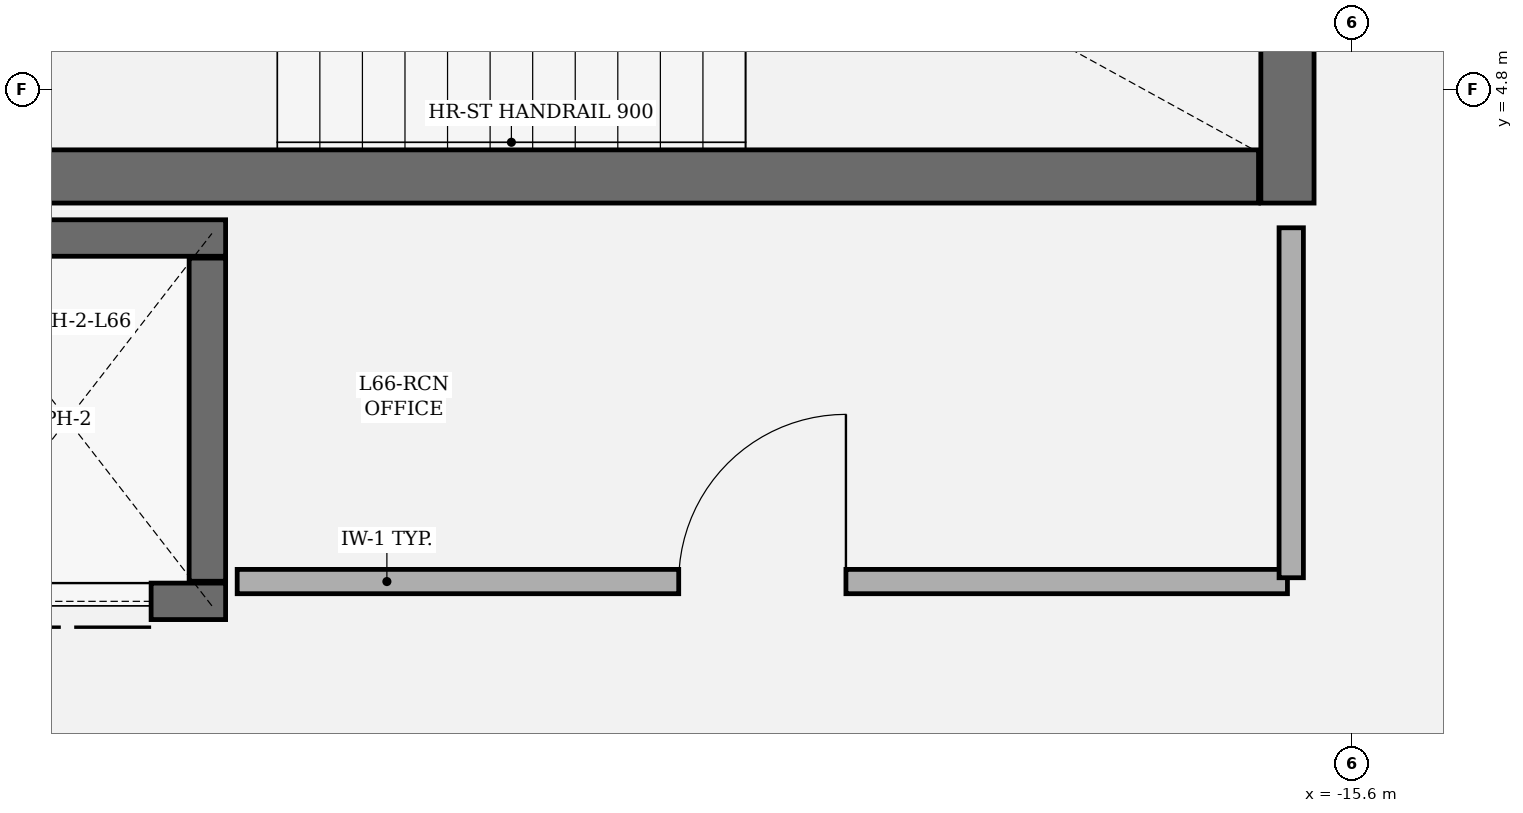
"""IFC4 building model, lengths in metres.
Left out: names, types, materials, properties, quantities, classifications, styles, units other than length and angle.
Written with IfcOpenShell. Run it as: python <this file> out.ifc"""

import sys

from ifc_helpers import new_model, si_unit, direction, frame, frame_2d, origin, place, context, subcontext, project, spatial, rectangle, extrude, element, fill, save


model = new_model("IFC4")
c1 = context("Model", 3, precision=1e-05, world=origin(), true_north=direction((0.0, 1.0)))
c2 = subcontext(c1, "Body", "Model", "MODEL_VIEW")
j1 = project(units=[si_unit("LENGTHUNIT", "METRE"), si_unit("PLANEANGLEUNIT", "RADIAN")], contexts=[c1])
p1 = place(None, origin())
s1 = spatial("IfcSite", under=j1, at=p1, CompositionType="ELEMENT")
p2 = place(p1, origin())
s2 = spatial("IfcBuilding", under=s1, at=p2, CompositionType="ELEMENT")
p3 = place(p2, frame((0.0, 0.0, 285.0)))
s3 = spatial("IfcBuildingStorey", under=s2, at=p3, CompositionType="ELEMENT", Elevation=285.0)
p4 = place(p3, frame((-16.025, 4.05, 0.0), z_axis=(0.0, 0.0, 1.0), x_axis=(0.0, 1.0, 0.0)))
e1 = element("IfcWall", 1, at=p4, inside=s3, PredefinedType="SHEAR", context=c2, shape_type="SweptSolid", body=[
    extrude(rectangle(XDim=4.21, YDim=0.35, at=frame_2d((2.105, 0.0))), origin(), (0.0, 0.0, 1.0), 3.91),
])
p5 = place(p3, frame((-24.335, 4.225, 0.0), z_axis=(0.0, 0.0, 1.0), x_axis=(1.0, 0.0, 0.0)))
e2 = element("IfcWall", 2, at=p5, inside=s3, PredefinedType="SHEAR", context=c2, shape_type="SweptSolid", body=[
    extrude(rectangle(XDim=8.12, YDim=0.35, at=frame_2d((4.06, 0.0))), origin(), (0.0, 0.0, 1.0), 3.91),
])
p6 = place(p3, frame((-23.01, 1.43, 0.0), z_axis=(0.0, 0.0, 1.0), x_axis=(-1.0, 0.0, 0.0)))
e3 = element("IfcWall", 3, at=p6, inside=s3, PredefinedType="SHEAR", context=c2, shape_type="SweptSolid", body=[
    extrude(rectangle(XDim=1.8, YDim=0.24, at=frame_2d((0.9, 0.0))), origin(), (0.0, 0.0, 1.0), 3.91),
])
p7 = place(p6, frame((0.49, 0.0, 0.0)))
e4 = element("IfcOpeningElement", 4, at=p7, cuts=e3, PredefinedType="OPENING", context=c2, shape_type="SweptSolid", body=[
    extrude(rectangle(XDim=1.1, YDim=2.2, at=frame_2d((0.55, 1.1))), frame((0.0, 0.13, 0.0), z_axis=(0.0, -1.0, 0.0), x_axis=(1.0, 0.0, 0.0)), (0.0, 0.0, 1.0), 0.26),
])
p8 = place(p3, frame((-24.81, 3.82, 0.0), z_axis=(0.0, 0.0, 1.0), x_axis=(1.0, 0.0, 0.0)))
e5 = element("IfcWall", 5, at=p8, inside=s3, PredefinedType="SHEAR", context=c2, shape_type="SweptSolid", body=[
    extrude(rectangle(XDim=1.8, YDim=0.24, at=frame_2d((0.9, 0.0))), origin(), (0.0, 0.0, 1.0), 3.91),
])
p9 = place(p3, frame((-23.13, 3.688, 0.0), z_axis=(0.0, 0.0, 1.0), x_axis=(0.0, -1.0, 0.0)))
e6 = element("IfcWall", 6, at=p9, inside=s3, PredefinedType="SHEAR", context=c2, shape_type="SweptSolid", body=[
    extrude(rectangle(XDim=2.126, YDim=0.24, at=frame_2d((1.063, 0.0))), origin(), (0.0, 0.0, 1.0), 3.91),
])
p10 = place(p3, frame((-22.934, 1.56, 0.0), z_axis=(0.0, 0.0, 1.0), x_axis=(1.0, 0.0, 0.0)))
e7 = element("IfcWall", 7, at=p10, inside=s3, PredefinedType="PARTITIONING", context=c2, shape_type="SweptSolid", body=[
    extrude(rectangle(XDim=6.909, YDim=0.16, at=frame_2d((3.455, 0.0))), origin(), (0.0, 0.0, 1.0), 3.91),
])
p11 = place(p10, frame((2.905, 0.0, 0.0)))
e8 = element("IfcOpeningElement", 8, at=p11, cuts=e7, PredefinedType="OPENING", context=c2, shape_type="SweptSolid", body=[
    extrude(rectangle(XDim=1.1, YDim=2.15, at=frame_2d((0.55, 1.075))), frame((0.0, 0.09, 0.0), z_axis=(0.0, -1.0, 0.0), x_axis=(1.0, 0.0, 0.0)), (0.0, 0.0, 1.0), 0.18),
])
p12 = place(p3, frame((-16.0, 1.585, 0.0), z_axis=(0.0, 0.0, 1.0), x_axis=(0.0, 1.0, 0.0)))
e9 = element("IfcWall", 9, at=p12, inside=s3, PredefinedType="PARTITIONING", context=c2, shape_type="SweptSolid", body=[
    extrude(rectangle(XDim=2.302, YDim=0.16, at=frame_2d((1.151, 0.0))), origin(), (0.0, 0.0, 1.0), 3.91),
])
p13 = place(p7, origin())
e10 = element("IfcDoor", 10, at=p13, inside=s3, OperationType="DOUBLE_DOOR_SLIDING", PredefinedType="DOOR", context=c2, shape_type="SweptSolid", body=[
    extrude(rectangle(XDim=1.1, YDim=2.2, at=frame_2d((0.55, 1.1))), frame((0.0, 0.025, 0.0), z_axis=(0.0, -1.0, 0.0), x_axis=(1.0, 0.0, 0.0)), (0.0, 0.0, 1.0), 0.05),
])
fill(e4, e10)
p14 = place(p11, origin())
e11 = element("IfcDoor", 11, at=p14, inside=s3, OperationType="SINGLE_SWING_RIGHT", PredefinedType="DOOR", context=c2, shape_type="SweptSolid", body=[
    extrude(rectangle(XDim=1.1, YDim=2.15, at=frame_2d((0.55, 1.075))), frame((0.0, 0.025, 0.0), z_axis=(0.0, -1.0, 0.0), x_axis=(1.0, 0.0, 0.0)), (0.0, 0.0, 1.0), 0.05),
])
fill(e8, e11)
save(model, sys.argv[1])
